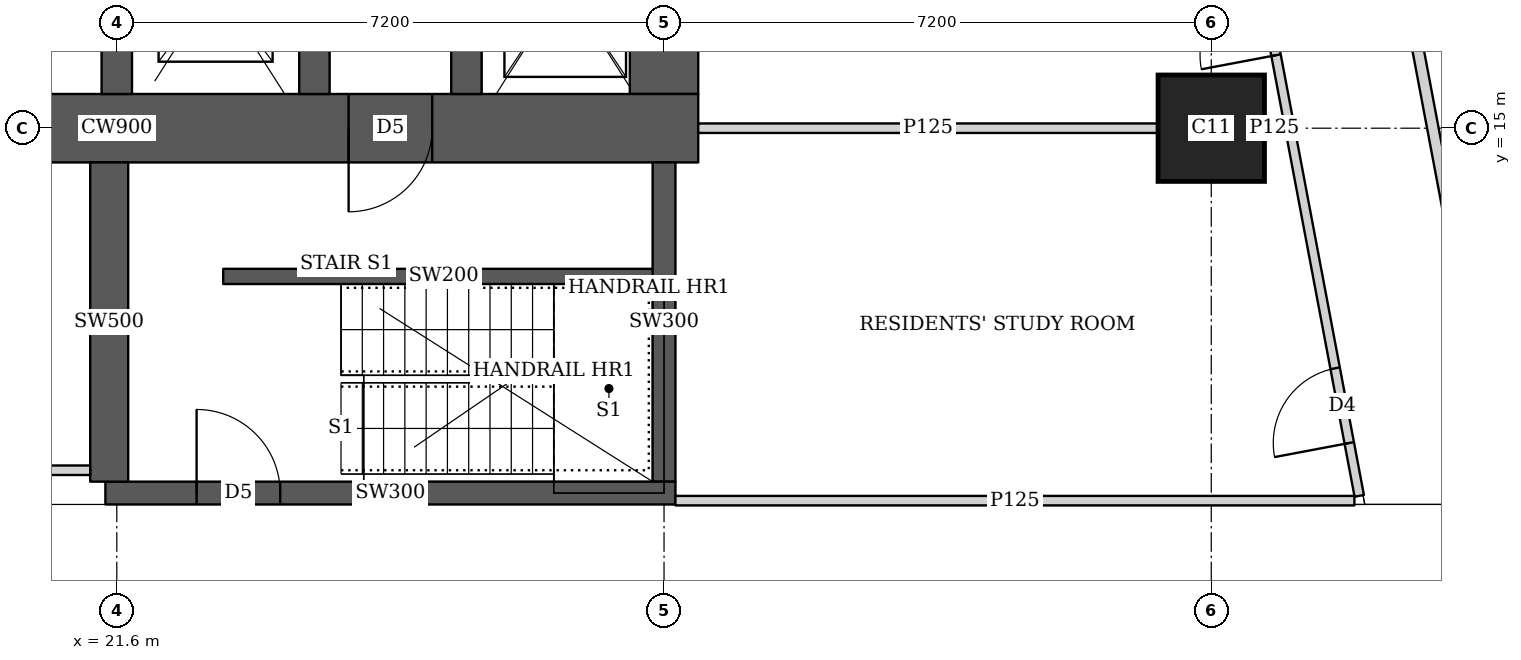
"""IFC4 building model, lengths in metres.
Left out: names, types, materials, properties, quantities, classifications, styles, units other than length and angle.
Written with IfcOpenShell. Run it as: python <this file> out.ifc"""

import sys

from ifc_helpers import new_model, si_unit, direction, frame, frame_2d, origin, origin_2d, place, context, subcontext, project, spatial, rectangle, extrude, element, fill, save


model = new_model("IFC4")
c1 = context("Model", 3, precision=1e-05, world=origin(), true_north=direction((0.0, 1.0)))
c2 = subcontext(c1, "Body", "Model", "MODEL_VIEW")
j1 = project(units=[si_unit("LENGTHUNIT", "METRE"), si_unit("PLANEANGLEUNIT", "RADIAN")], contexts=[c1])
p1 = place(None, origin())
s1 = spatial("IfcSite", under=j1, at=p1, CompositionType="ELEMENT")
p2 = place(p1, origin())
s2 = spatial("IfcBuilding", under=s1, at=p2, CompositionType="ELEMENT")
p3 = place(p2, frame((0.0, 0.0, 277.85)))
s3 = spatial("IfcBuildingStorey", under=s2, at=p3, CompositionType="ELEMENT", Elevation=277.85)
p4 = place(p3, frame((36.0, 15.0, 0.0), z_axis=(0.0, 0.0, 1.0), x_axis=(1.0, 0.0, 0.0)))
e1 = element("IfcColumn", 1, at=p4, inside=s3, PredefinedType="COLUMN", context=c2, shape_type="SweptSolid", body=[
    extrude(rectangle(XDim=1.4, YDim=1.4, at=origin_2d()), origin(), (0.0, 0.0, 1.0), 3.75),
])
p5 = place(p3, frame((13.95, 15.0, 0.0), z_axis=(0.0, 0.0, 1.0), x_axis=(1.0, 0.0, 0.0)))
e2 = element("IfcWall", 2, at=p5, inside=s3, PredefinedType="SHEAR", context=c2, shape_type="SweptSolid", body=[
    extrude(rectangle(XDim=15.3, YDim=0.9, at=frame_2d((7.65, 0.0))), origin(), (0.0, 0.0, 1.0), 3.75),
])
p6 = place(p5, frame((4.45, 0.0, 0.0)))
e3 = element("IfcOpeningElement", 3, at=p6, cuts=e2, PredefinedType="OPENING", context=c2, shape_type="SweptSolid", body=[
    extrude(rectangle(XDim=1.8, YDim=2.1, at=frame_2d((0.9, 1.05))), frame((0.0, 0.46, 0.0), z_axis=(0.0, -1.0, 0.0), x_axis=(1.0, 0.0, 0.0)), (0.0, 0.0, 1.0), 0.92),
])
p7 = place(p5, frame((10.7, 0.0, 0.0)))
e4 = element("IfcOpeningElement", 4, at=p7, cuts=e2, PredefinedType="OPENING", context=c2, shape_type="SweptSolid", body=[
    extrude(rectangle(XDim=1.1, YDim=2.1, at=frame_2d((0.55, 1.05))), frame((0.0, 0.46, 0.0), z_axis=(0.0, -1.0, 0.0), x_axis=(1.0, 0.0, 0.0)), (0.0, 0.0, 1.0), 0.92),
])
p8 = place(p3, frame((28.8, 15.45, 0.0), z_axis=(0.0, 0.0, 1.0), x_axis=(0.0, 1.0, 0.0)))
e5 = element("IfcWall", 5, at=p8, inside=s3, PredefinedType="SHEAR", context=c2, shape_type="SweptSolid", body=[
    extrude(rectangle(XDim=14.1, YDim=0.9, at=frame_2d((7.05, 0.0))), origin(), (0.0, 0.0, 1.0), 3.75),
])
p9 = place(p3, frame((21.6, 15.45, 0.0), z_axis=(0.0, 0.0, 1.0), x_axis=(0.0, 1.0, 0.0)))
e6 = element("IfcWall", 6, at=p9, inside=s3, PredefinedType="SHEAR", context=c2, shape_type="SweptSolid", body=[
    extrude(rectangle(XDim=14.1, YDim=0.4, at=frame_2d((7.05, 0.0))), origin(), (0.0, 0.0, 1.0), 3.75),
])
p10 = place(p9, frame((0.875, 0.0, 0.0)))
e7 = element("IfcOpeningElement", 7, at=p10, cuts=e6, PredefinedType="OPENING", context=c2, shape_type="SweptSolid", body=[
    extrude(rectangle(XDim=1.1, YDim=2.1, at=frame_2d((0.55, 1.05))), frame((0.0, 0.21, 0.0), z_axis=(0.0, -1.0, 0.0), x_axis=(1.0, 0.0, 0.0)), (0.0, 0.0, 1.0), 0.42),
])
p11 = place(p9, frame((4.625, 0.0, 0.0)))
e8 = element("IfcOpeningElement", 8, at=p11, cuts=e6, PredefinedType="OPENING", context=c2, shape_type="SweptSolid", body=[
    extrude(rectangle(XDim=1.1, YDim=2.1, at=frame_2d((0.55, 1.05))), frame((0.0, 0.21, 0.0), z_axis=(0.0, -1.0, 0.0), x_axis=(1.0, 0.0, 0.0)), (0.0, 0.0, 1.0), 0.42),
])
p12 = place(p9, frame((8.375, 0.0, 0.0)))
e9 = element("IfcOpeningElement", 9, at=p12, cuts=e6, PredefinedType="OPENING", context=c2, shape_type="SweptSolid", body=[
    extrude(rectangle(XDim=1.1, YDim=2.1, at=frame_2d((0.55, 1.05))), frame((0.0, 0.21, 0.0), z_axis=(0.0, -1.0, 0.0), x_axis=(1.0, 0.0, 0.0)), (0.0, 0.0, 1.0), 0.42),
])
p13 = place(p9, frame((12.125, 0.0, 0.0)))
e10 = element("IfcOpeningElement", 10, at=p13, cuts=e6, PredefinedType="OPENING", context=c2, shape_type="SweptSolid", body=[
    extrude(rectangle(XDim=1.1, YDim=2.1, at=frame_2d((0.55, 1.05))), frame((0.0, 0.21, 0.0), z_axis=(0.0, -1.0, 0.0), x_axis=(1.0, 0.0, 0.0)), (0.0, 0.0, 1.0), 0.42),
])
p14 = place(p3, frame((24.2, 15.45, 0.0), z_axis=(0.0, 0.0, 1.0), x_axis=(0.0, 1.0, 0.0)))
e11 = element("IfcWall", 11, at=p14, inside=s3, PredefinedType="SHEAR", context=c2, shape_type="SweptSolid", body=[
    extrude(rectangle(XDim=14.1, YDim=0.4, at=frame_2d((7.05, 0.0))), origin(), (0.0, 0.0, 1.0), 3.75),
])
p15 = place(p3, frame((26.2, 15.45, 0.0), z_axis=(0.0, 0.0, 1.0), x_axis=(0.0, 1.0, 0.0)))
e12 = element("IfcWall", 12, at=p15, inside=s3, PredefinedType="SHEAR", context=c2, shape_type="SweptSolid", body=[
    extrude(rectangle(XDim=3.1, YDim=0.4, at=frame_2d((1.55, 0.0))), origin(), (0.0, 0.0, 1.0), 3.75),
])
p16 = place(p15, frame((0.825, 0.0, 0.0)))
e13 = element("IfcOpeningElement", 13, at=p16, cuts=e12, PredefinedType="OPENING", context=c2, shape_type="SweptSolid", body=[
    extrude(rectangle(XDim=1.2, YDim=2.1, at=frame_2d((0.6, 1.05))), frame((0.0, 0.21, 0.0), z_axis=(0.0, -1.0, 0.0), x_axis=(1.0, 0.0, 0.0)), (0.0, 0.0, 1.0), 0.42),
])
p17 = place(p3, frame((21.45, 10.2, 0.0), z_axis=(0.0, 0.0, 1.0), x_axis=(1.0, 0.0, 0.0)))
e14 = element("IfcWall", 14, at=p17, inside=s3, PredefinedType="SHEAR", context=c2, shape_type="SweptSolid", body=[
    extrude(rectangle(XDim=7.5, YDim=0.3, at=frame_2d((3.75, 0.0))), origin(), (0.0, 0.0, 1.0), 3.75),
])
p18 = place(p17, frame((1.2, 0.0, 0.0)))
e15 = element("IfcOpeningElement", 15, at=p18, cuts=e14, PredefinedType="OPENING", context=c2, shape_type="SweptSolid", body=[
    extrude(rectangle(XDim=1.1, YDim=2.1, at=frame_2d((0.55, 1.05))), frame((0.0, 0.16, 0.0), z_axis=(0.0, -1.0, 0.0), x_axis=(1.0, 0.0, 0.0)), (0.0, 0.0, 1.0), 0.32),
])
p19 = place(p3, frame((21.5, 10.35, 0.0), z_axis=(0.0, 0.0, 1.0), x_axis=(0.0, 1.0, 0.0)))
e16 = element("IfcWall", 16, at=p19, inside=s3, PredefinedType="SHEAR", context=c2, shape_type="SweptSolid", body=[
    extrude(rectangle(XDim=4.2, YDim=0.5, at=frame_2d((2.1, 0.0))), origin(), (0.0, 0.0, 1.0), 3.75),
])
p20 = place(p3, frame((28.8, 10.35, 0.0), z_axis=(0.0, 0.0, 1.0), x_axis=(0.0, 1.0, 0.0)))
e17 = element("IfcWall", 17, at=p20, inside=s3, PredefinedType="SHEAR", context=c2, shape_type="SweptSolid", body=[
    extrude(rectangle(XDim=4.2, YDim=0.3, at=frame_2d((2.1, 0.0))), origin(), (0.0, 0.0, 1.0), 3.75),
])
p21 = place(p3, frame((33.781, 42.186, 0.0), z_axis=(0.0, 0.0, 1.0), x_axis=(0.185593518645, -0.9826266055, 0.0)))
e18 = element("IfcWall", 18, at=p21, inside=s3, PredefinedType="SOLIDWALL", context=c2, shape_type="SweptSolid", body=[
    extrude(rectangle(XDim=35.961, YDim=0.15, at=frame_2d((17.98, 0.0))), origin(), (0.0, 0.0, 1.0), 2.5),
])
p22 = place(p21, frame((11.76, 0.0, 0.0)))
e19 = element("IfcOpeningElement", 19, at=p22, cuts=e18, PredefinedType="OPENING", context=c2, shape_type="SweptSolid", body=[
    extrude(rectangle(XDim=1.0, YDim=2.1, at=frame_2d((0.5, 1.05))), frame((0.0, 0.085, 0.0), z_axis=(0.0, -1.0, 0.0), x_axis=(1.0, 0.0, 0.0)), (0.0, 0.0, 1.0), 0.17),
])
p23 = place(p21, frame((15.576, 0.0, 0.0)))
e20 = element("IfcOpeningElement", 20, at=p23, cuts=e18, PredefinedType="OPENING", context=c2, shape_type="SweptSolid", body=[
    extrude(rectangle(XDim=1.0, YDim=2.1, at=frame_2d((0.5, 1.05))), frame((0.0, 0.085, 0.0), z_axis=(0.0, -1.0, 0.0), x_axis=(1.0, 0.0, 0.0)), (0.0, 0.0, 1.0), 0.17),
])
p24 = place(p21, frame((30.502, 0.0, 0.0)))
e21 = element("IfcOpeningElement", 21, at=p24, cuts=e18, PredefinedType="OPENING", context=c2, shape_type="SweptSolid", body=[
    extrude(rectangle(XDim=1.0, YDim=2.1, at=frame_2d((0.5, 1.05))), frame((0.0, 0.085, 0.0), z_axis=(0.0, -1.0, 0.0), x_axis=(1.0, 0.0, 0.0)), (0.0, 0.0, 1.0), 0.17),
])
p25 = place(p3, frame((13.75, 10.5, 0.0), z_axis=(0.0, 0.0, 1.0), x_axis=(1.0, 0.0, 0.0)))
e22 = element("IfcWall", 22, at=p25, inside=s3, PredefinedType="PARTITIONING", context=c2, shape_type="SweptSolid", body=[
    extrude(rectangle(XDim=7.5, YDim=0.125, at=frame_2d((3.75, 0.0))), origin(), (0.0, 0.0, 1.0), 3.5),
])
p26 = place(p25, frame((4.245, 0.0, 0.0)))
e23 = element("IfcOpeningElement", 23, at=p26, cuts=e22, PredefinedType="OPENING", context=c2, shape_type="SweptSolid", body=[
    extrude(rectangle(XDim=1.8, YDim=2.1, at=frame_2d((0.9, 1.05))), frame((0.0, 0.073, 0.0), z_axis=(0.0, -1.0, 0.0), x_axis=(1.0, 0.0, 0.0)), (0.0, 0.0, 1.0), 0.145),
])
p27 = place(p3, frame((28.95, 10.1, 0.0), z_axis=(0.0, 0.0, 1.0), x_axis=(1.0, 0.0, 0.0)))
e24 = element("IfcWall", 24, at=p27, inside=s3, PredefinedType="PARTITIONING", context=c2, shape_type="SweptSolid", body=[
    extrude(rectangle(XDim=8.933, YDim=0.125, at=frame_2d((4.467, 0.0))), origin(), (0.0, 0.0, 1.0), 3.5),
])
p28 = place(p3, frame((37.947, 10.163, 0.0), z_axis=(0.0, 0.0, 1.0), x_axis=(-0.185572770922, 0.982630523998, 0.0)))
e25 = element("IfcWall", 25, at=p28, inside=s3, PredefinedType="PARTITIONING", context=c2, shape_type="SweptSolid", body=[
    extrude(rectangle(XDim=25.111, YDim=0.125, at=frame_2d((12.556, 0.0))), origin(), (0.0, 0.0, 1.0), 2.5),
])
p29 = place(p28, frame((0.708, 0.0, 0.0)))
e26 = element("IfcOpeningElement", 26, at=p29, cuts=e25, PredefinedType="OPENING", context=c2, shape_type="SweptSolid", body=[
    extrude(rectangle(XDim=1.0, YDim=2.1, at=frame_2d((0.5, 1.05))), frame((0.0, 0.073, 0.0), z_axis=(0.0, -1.0, 0.0), x_axis=(1.0, 0.0, 0.0)), (0.0, 0.0, 1.0), 0.145),
])
p30 = place(p28, frame((5.9, 0.0, 0.0)))
e27 = element("IfcOpeningElement", 27, at=p30, cuts=e25, PredefinedType="OPENING", context=c2, shape_type="SweptSolid", body=[
    extrude(rectangle(XDim=1.0, YDim=2.1, at=frame_2d((0.5, 1.05))), frame((0.0, 0.073, 0.0), z_axis=(0.0, -1.0, 0.0), x_axis=(1.0, 0.0, 0.0)), (0.0, 0.0, 1.0), 0.145),
])
p31 = place(p28, frame((13.378, 0.0, 0.0)))
e28 = element("IfcOpeningElement", 28, at=p31, cuts=e25, PredefinedType="OPENING", context=c2, shape_type="SweptSolid", body=[
    extrude(rectangle(XDim=1.0, YDim=2.1, at=frame_2d((0.5, 1.05))), frame((0.0, 0.073, 0.0), z_axis=(0.0, -1.0, 0.0), x_axis=(1.0, 0.0, 0.0)), (0.0, 0.0, 1.0), 0.145),
])
p32 = place(p28, frame((21.15, 0.0, 0.0)))
e29 = element("IfcOpeningElement", 29, at=p32, cuts=e25, PredefinedType="OPENING", context=c2, shape_type="SweptSolid", body=[
    extrude(rectangle(XDim=1.0, YDim=2.1, at=frame_2d((0.5, 1.05))), frame((0.0, 0.073, 0.0), z_axis=(0.0, -1.0, 0.0), x_axis=(1.0, 0.0, 0.0)), (0.0, 0.0, 1.0), 0.145),
])
p33 = place(p3, frame((29.25, 15.0, 0.0), z_axis=(0.0, 0.0, 1.0), x_axis=(1.0, 0.0, 0.0)))
e30 = element("IfcWall", 30, at=p33, inside=s3, PredefinedType="PARTITIONING", context=c2, shape_type="SweptSolid", body=[
    extrude(rectangle(XDim=6.049, YDim=0.125, at=frame_2d((3.024, 0.0))), origin(), (0.0, 0.0, 1.0), 3.5),
])
p34 = place(p3, frame((36.701, 15.0, 0.0), z_axis=(0.0, 0.0, 1.0), x_axis=(1.0, 0.0, 0.0)))
e31 = element("IfcWall", 31, at=p34, inside=s3, PredefinedType="PARTITIONING", context=c2, shape_type="SweptSolid", body=[
    extrude(rectangle(XDim=0.257, YDim=0.125, at=frame_2d((0.128, 0.0))), origin(), (0.0, 0.0, 1.0), 3.5),
])
p35 = place(p3, frame((23.0, 13.05, 0.0), z_axis=(0.0, 0.0, 1.0), x_axis=(1.0, 0.0, 0.0)))
e32 = element("IfcWall", 32, at=p35, inside=s3, PredefinedType="SHEAR", context=c2, shape_type="SweptSolid", body=[
    extrude(rectangle(XDim=5.8, YDim=0.2, at=frame_2d((2.9, 0.0))), origin(), (0.0, 0.0, 1.0), 3.75),
])
p36 = place(p29, origin())
e33 = element("IfcDoor", 33, at=p36, inside=s3, OperationType="SINGLE_SWING_LEFT", PredefinedType="DOOR", context=c2, shape_type="SweptSolid", body=[
    extrude(rectangle(XDim=1.0, YDim=2.1, at=frame_2d((0.5, 1.05))), frame((0.0, 0.025, 0.0), z_axis=(0.0, -1.0, 0.0), x_axis=(1.0, 0.0, 0.0)), (0.0, 0.0, 1.0), 0.05),
])
fill(e26, e33)
p37 = place(p30, origin())
e34 = element("IfcDoor", 34, at=p37, inside=s3, OperationType="SINGLE_SWING_LEFT", PredefinedType="DOOR", context=c2, shape_type="SweptSolid", body=[
    extrude(rectangle(XDim=1.0, YDim=2.1, at=frame_2d((0.5, 1.05))), frame((0.0, 0.025, 0.0), z_axis=(0.0, -1.0, 0.0), x_axis=(1.0, 0.0, 0.0)), (0.0, 0.0, 1.0), 0.05),
])
fill(e27, e34)
p38 = place(p7, origin())
e35 = element("IfcDoor", 35, at=p38, inside=s3, OperationType="SINGLE_SWING_RIGHT", PredefinedType="DOOR", context=c2, shape_type="SweptSolid", body=[
    extrude(rectangle(XDim=1.1, YDim=2.1, at=frame_2d((0.55, 1.05))), frame((0.0, 0.025, 0.0), z_axis=(0.0, -1.0, 0.0), x_axis=(1.0, 0.0, 0.0)), (0.0, 0.0, 1.0), 0.05),
])
fill(e4, e35)
p39 = place(p18, origin())
e36 = element("IfcDoor", 36, at=p39, inside=s3, OperationType="SINGLE_SWING_LEFT", PredefinedType="DOOR", context=c2, shape_type="SweptSolid", body=[
    extrude(rectangle(XDim=1.1, YDim=2.1, at=frame_2d((0.55, 1.05))), frame((0.0, 0.025, 0.0), z_axis=(0.0, -1.0, 0.0), x_axis=(1.0, 0.0, 0.0)), (0.0, 0.0, 1.0), 0.05),
])
fill(e15, e36)
save(model, sys.argv[1])
